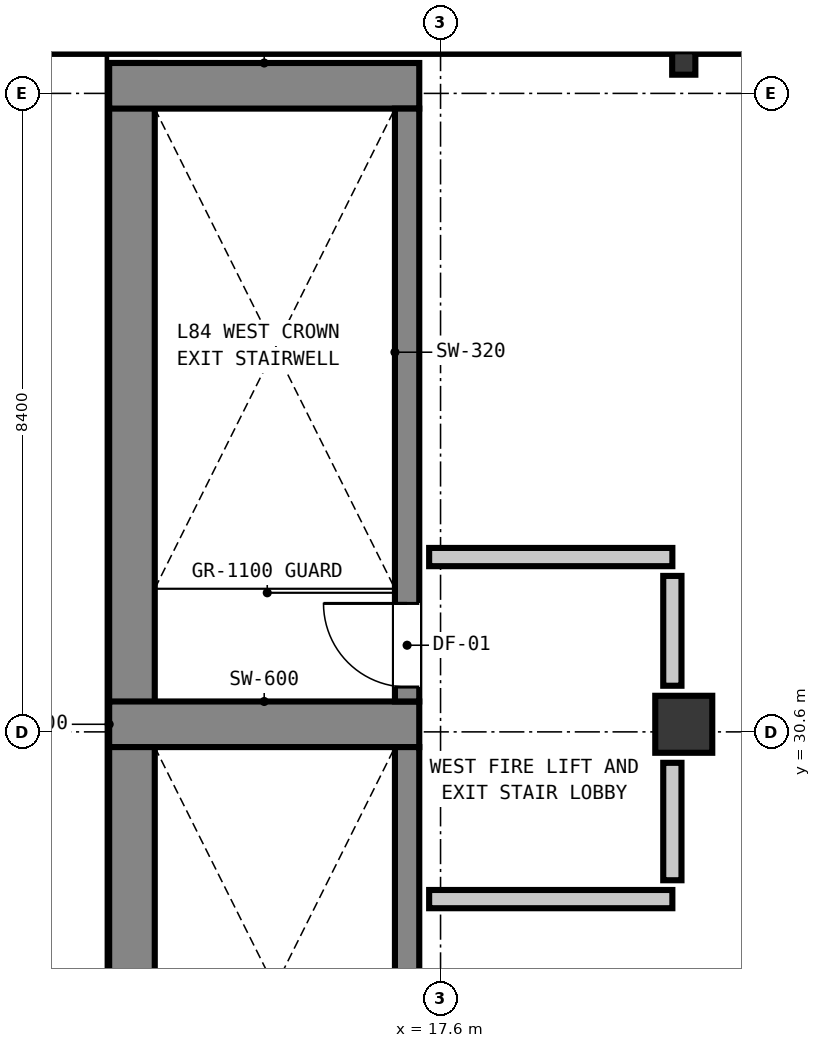
"""IFC4 building model, lengths in metres.
Left out: names, types, materials, properties, quantities, classifications, styles, units other than length and angle.
Written with IfcOpenShell. Run it as: python <this file> out.ifc"""

import sys

from ifc_helpers import new_model, si_unit, direction, frame, frame_2d, origin, origin_2d, place, context, subcontext, project, spatial, rectangle, i_section, extrude, element, fill, save


model = new_model("IFC4")
c1 = context("Model", 3, precision=1e-05, world=origin(), true_north=direction((0.0, 1.0)))
c2 = subcontext(c1, "Body", "Model", "MODEL_VIEW")
j1 = project(units=[si_unit("LENGTHUNIT", "METRE"), si_unit("PLANEANGLEUNIT", "RADIAN")], contexts=[c1])
p1 = place(None, origin())
s1 = spatial("IfcSite", under=j1, at=p1, CompositionType="ELEMENT")
p2 = place(p1, origin())
s2 = spatial("IfcBuilding", under=s1, at=p2, CompositionType="ELEMENT")
p3 = place(p2, frame((0.0, 0.0, 297.68)))
s3 = spatial("IfcBuildingStorey", under=s2, at=p3, CompositionType="ELEMENT", Elevation=297.68)
p4 = place(p3, frame((13.54, 22.0, 0.0), z_axis=(0.0, 0.0, 1.0), x_axis=(0.0, 1.0, 0.0)))
e1 = element("IfcWall", 1, at=p4, inside=s3, PredefinedType="SHEAR", context=c2, shape_type="SweptSolid", body=[
    extrude(rectangle(XDim=17.4, YDim=0.6, at=frame_2d((8.7, 0.0))), origin(), (0.0, 0.0, 1.0), 4.9),
])
for number, where, z_axis, x_axis in (
    (2, (13.24, 39.1, 0.0), (0.0, 0.0, 1.0), (1.0, 0.0, 0.0)),
    (3, (13.24, 30.7, 0.0), (0.0, 0.0, 1.0), (1.0, 0.0, 0.0)),
):
    element("IfcWall", number, at=place(p3, frame(where, z_axis=z_axis, x_axis=x_axis)), inside=s3, PredefinedType="SHEAR", context=c2, shape_type="SweptSolid", body=[
        extrude(rectangle(XDim=4.08, YDim=0.6, at=frame_2d((2.04, 0.0))), origin(), (0.0, 0.0, 1.0), 4.9),
    ])
p5 = place(p3, frame((17.16, 31.0, 0.0), z_axis=(0.0, 0.0, 1.0), x_axis=(0.0, 1.0, 0.0)))
e4 = element("IfcWall", 4, at=p5, inside=s3, PredefinedType="SHEAR", context=c2, shape_type="SweptSolid", body=[
    extrude(rectangle(XDim=7.8, YDim=0.32, at=frame_2d((3.9, 0.0))), origin(), (0.0, 0.0, 1.0), 4.9),
])
p6 = place(p5, frame((0.19, 0.0, 0.0)))
e5 = element("IfcOpeningElement", 5, at=p6, cuts=e4, PredefinedType="OPENING", context=c2, shape_type="SweptSolid", body=[
    extrude(rectangle(XDim=1.1, YDim=2.15, at=frame_2d((0.55, 1.075))), frame((0.0, 0.17, 0.0), z_axis=(0.0, -1.0, 0.0), x_axis=(1.0, 0.0, 0.0)), (0.0, 0.0, 1.0), 0.34),
])
p7 = place(p3, frame((17.16, 22.3, 0.0), z_axis=(0.0, 0.0, 1.0), x_axis=(0.0, 1.0, 0.0)))
e6 = element("IfcWall", 6, at=p7, inside=s3, PredefinedType="SHEAR", context=c2, shape_type="SweptSolid", body=[
    extrude(rectangle(XDim=8.1, YDim=0.32, at=frame_2d((4.05, 0.0))), origin(), (0.0, 0.0, 1.0), 4.9),
])
p8 = place(p7, frame((0.49, 0.0, 0.0)))
e7 = element("IfcOpeningElement", 7, at=p8, cuts=e6, PredefinedType="OPENING", context=c2, shape_type="SweptSolid", body=[
    extrude(rectangle(XDim=1.1, YDim=2.15, at=frame_2d((0.55, 1.075))), frame((0.0, 0.17, 0.0), z_axis=(0.0, -1.0, 0.0), x_axis=(1.0, 0.0, 0.0)), (0.0, 0.0, 1.0), 0.34),
])
p9 = place(p3, frame((20.8, 30.7, 0.0), z_axis=(0.0, 0.0, 1.0), x_axis=(1.0, 0.0, 0.0)))
e8 = element("IfcColumn", 8, at=p9, inside=s3, PredefinedType="COLUMN", context=c2, shape_type="SweptSolid", body=[
    extrude(rectangle(XDim=0.75, YDim=0.75, at=origin_2d()), origin(), (0.0, 0.0, 1.0), 4.9),
])
p10 = place(p3, frame((20.8, 39.4, 0.0), z_axis=(0.0, 0.0, 1.0), x_axis=(1.0, 0.0, 0.0)))
e9 = element("IfcColumn", 9, at=p10, inside=s3, PredefinedType="COLUMN", context=c2, shape_type="SweptSolid", body=[
    extrude(i_section(OverallWidth=0.305, OverallDepth=0.308, WebThickness=0.01, FlangeThickness=0.015, at=origin_2d()), origin(), (0.0, 0.0, 1.0), 4.9),
])
p11 = place(p3, frame((10.35, 39.65, 0.0), z_axis=(0.0, 0.0, 1.0), x_axis=(1.0, 0.0, 0.0)))
e10 = element("IfcWall", 10, at=p11, inside=s3, PredefinedType="STANDARD", context=c2, shape_type="SweptSolid", body=[
    extrude(rectangle(XDim=12.32, YDim=0.26, at=frame_2d((6.16, 0.0))), origin(), (0.0, 0.0, 1.0), 4.034),
])
for number, where, z_axis, x_axis in (
    (11, (17.45, 28.4, 0.0), (0.0, 0.0, 1.0), (1.0, 0.0, 0.0)),
    (12, (17.45, 32.9, 0.0), (0.0, 0.0, 1.0), (1.0, 0.0, 0.0)),
):
    element("IfcWall", number, at=place(p3, frame(where, z_axis=z_axis, x_axis=x_axis)), inside=s3, PredefinedType="PARTITIONING", context=c2, shape_type="SweptSolid", body=[
        extrude(rectangle(XDim=3.2, YDim=0.24, at=frame_2d((1.6, 0.0))), origin(), (0.0, 0.0, 1.0), 4.56),
    ])
p12 = place(p3, frame((20.65, 28.648, 0.0), z_axis=(0.0, 0.0, 1.0), x_axis=(0.0, 1.0, 0.0)))
e13 = element("IfcWall", 13, at=p12, inside=s3, PredefinedType="PARTITIONING", context=c2, shape_type="SweptSolid", body=[
    extrude(rectangle(XDim=1.545, YDim=0.24, at=frame_2d((0.772, 0.0))), origin(), (0.0, 0.0, 1.0), 4.192),
])
p13 = place(p3, frame((20.65, 31.207, 0.0), z_axis=(0.0, 0.0, 1.0), x_axis=(0.0, 1.0, 0.0)))
e14 = element("IfcWall", 14, at=p13, inside=s3, PredefinedType="PARTITIONING", context=c2, shape_type="SweptSolid", body=[
    extrude(rectangle(XDim=1.445, YDim=0.24, at=frame_2d((0.723, 0.0))), origin(), (0.0, 0.0, 1.0), 4.192),
])
p14 = place(p6, origin())
e15 = element("IfcDoor", 15, at=p14, inside=s3, OperationType="SINGLE_SWING_RIGHT", PredefinedType="DOOR", context=c2, shape_type="SweptSolid", body=[
    extrude(rectangle(XDim=1.1, YDim=2.15, at=frame_2d((0.55, 1.075))), frame((0.0, 0.025, 0.0), z_axis=(0.0, -1.0, 0.0), x_axis=(1.0, 0.0, 0.0)), (0.0, 0.0, 1.0), 0.05),
])
fill(e5, e15)
save(model, sys.argv[1])
